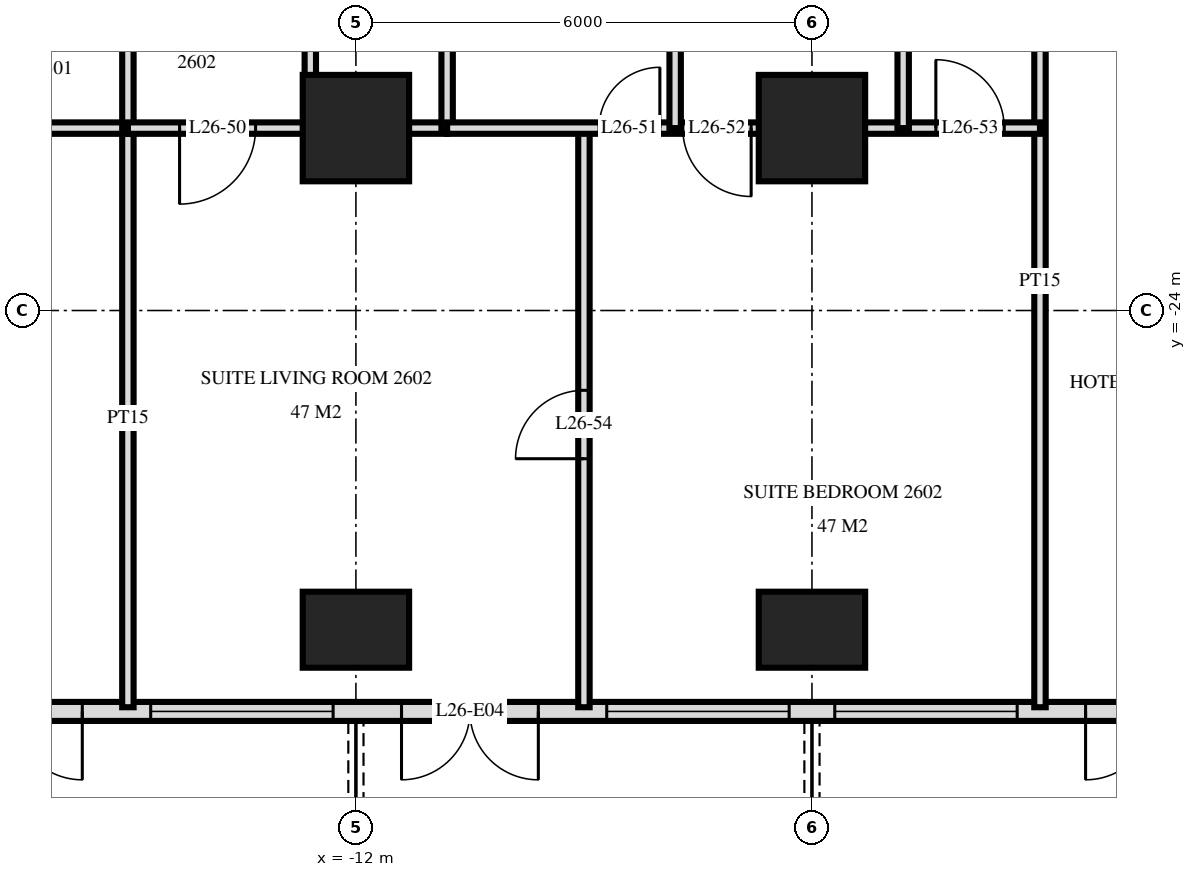
"""IFC4 building model, lengths in metres.
Left out: names, types, materials, properties, quantities, classifications, styles, units other than length and angle.
Written with IfcOpenShell. Run it as: python <this file> out.ifc"""

import sys

from ifc_helpers import new_model, si_unit, direction, frame, frame_2d, origin, origin_2d, place, context, subcontext, project, spatial, rectangle, extrude, element, fill, save


model = new_model("IFC4")
c1 = context("Model", 3, precision=1e-05, world=origin(), true_north=direction((0.0, 1.0)))
c2 = subcontext(c1, "Body", "Model", "MODEL_VIEW")
j1 = project(units=[si_unit("LENGTHUNIT", "METRE"), si_unit("PLANEANGLEUNIT", "RADIAN")], contexts=[c1])
p1 = place(None, origin())
s1 = spatial("IfcSite", under=j1, at=p1, CompositionType="ELEMENT")
p2 = place(p1, origin())
s2 = spatial("IfcBuilding", under=s1, at=p2, CompositionType="ELEMENT")
p3 = place(p2, frame((0.0, 0.0, 103.2)))
s3 = spatial("IfcBuildingStorey", under=s2, at=p3, CompositionType="ELEMENT", Elevation=103.2)
p4 = place(p3, frame((-12.0, -28.2, 0.0), z_axis=(0.0, 0.0, 1.0), x_axis=(1.0, 0.0, 0.0)))
e1 = element("IfcColumn", 1, at=p4, inside=s3, PredefinedType="COLUMN", context=c2, shape_type="SweptSolid", body=[
    extrude(rectangle(XDim=1.4, YDim=1.0, at=origin_2d()), origin(), (0.0, 0.0, 1.0), 3.6),
])
p5 = place(p3, frame((-12.0, -21.6, 0.0), z_axis=(0.0, 0.0, 1.0), x_axis=(1.0, 0.0, 0.0)))
e2 = element("IfcColumn", 2, at=p5, inside=s3, PredefinedType="COLUMN", context=c2, shape_type="SweptSolid", body=[
    extrude(rectangle(XDim=1.4, YDim=1.4, at=origin_2d()), origin(), (0.0, 0.0, 1.0), 3.6),
])
p6 = place(p3, frame((-6.0, -28.2, 0.0), z_axis=(0.0, 0.0, 1.0), x_axis=(1.0, 0.0, 0.0)))
e3 = element("IfcColumn", 3, at=p6, inside=s3, PredefinedType="COLUMN", context=c2, shape_type="SweptSolid", body=[
    extrude(rectangle(XDim=1.4, YDim=1.0, at=origin_2d()), origin(), (0.0, 0.0, 1.0), 3.6),
])
p7 = place(p3, frame((-6.0, -21.6, 0.0), z_axis=(0.0, 0.0, 1.0), x_axis=(1.0, 0.0, 0.0)))
e4 = element("IfcColumn", 4, at=p7, inside=s3, PredefinedType="COLUMN", context=c2, shape_type="SweptSolid", body=[
    extrude(rectangle(XDim=1.4, YDim=1.4, at=origin_2d()), origin(), (0.0, 0.0, 1.0), 3.6),
])
p8 = place(p3, frame((-28.775, -29.275, 0.0), z_axis=(0.0, 0.0, 1.0), x_axis=(1.0, 0.0, 0.0)))
e5 = element("IfcWall", 5, at=p8, inside=s3, PredefinedType="SOLIDWALL", context=c2, shape_type="SweptSolid", body=[
    extrude(rectangle(XDim=57.551, YDim=0.25, at=frame_2d((28.775, 0.0))), origin(), (0.0, 0.0, 1.0), 3.3),
])
p9 = place(p8, frame((0.575, 0.0, 0.0)))
e6 = element("IfcOpeningElement", 6, at=p9, cuts=e5, PredefinedType="OPENING", context=c2, shape_type="SweptSolid", body=[
    extrude(rectangle(XDim=1.8, YDim=2.4, at=frame_2d((0.9, 1.2))), frame((0.0, 0.135, 0.0), z_axis=(0.0, -1.0, 0.0), x_axis=(1.0, 0.0, 0.0)), (0.0, 0.0, 1.0), 0.27),
])
p10 = place(p8, frame((5.375, 0.0, 0.0)))
e7 = element("IfcOpeningElement", 7, at=p10, cuts=e5, PredefinedType="OPENING", context=c2, shape_type="SweptSolid", body=[
    extrude(rectangle(XDim=1.8, YDim=2.4, at=frame_2d((0.9, 1.2))), frame((0.0, 0.135, 0.0), z_axis=(0.0, -1.0, 0.0), x_axis=(1.0, 0.0, 0.0)), (0.0, 0.0, 1.0), 0.27),
])
p11 = place(p8, frame((8.075, 0.0, 0.3)))
e8 = element("IfcOpeningElement", 8, at=p11, cuts=e5, PredefinedType="OPENING", context=c2, shape_type="SweptSolid", body=[
    extrude(rectangle(XDim=2.4, YDim=2.1, at=frame_2d((1.2, 1.05))), frame((0.0, 0.135, 0.0), z_axis=(0.0, -1.0, 0.0), x_axis=(1.0, 0.0, 0.0)), (0.0, 0.0, 1.0), 0.27),
])
p12 = place(p8, frame((11.375, 0.0, 0.0)))
e9 = element("IfcOpeningElement", 9, at=p12, cuts=e5, PredefinedType="OPENING", context=c2, shape_type="SweptSolid", body=[
    extrude(rectangle(XDim=1.8, YDim=2.4, at=frame_2d((0.9, 1.2))), frame((0.0, 0.135, 0.0), z_axis=(0.0, -1.0, 0.0), x_axis=(1.0, 0.0, 0.0)), (0.0, 0.0, 1.0), 0.27),
])
p13 = place(p8, frame((14.075, 0.0, 0.3)))
e10 = element("IfcOpeningElement", 10, at=p13, cuts=e5, PredefinedType="OPENING", context=c2, shape_type="SweptSolid", body=[
    extrude(rectangle(XDim=2.4, YDim=2.1, at=frame_2d((1.2, 1.05))), frame((0.0, 0.135, 0.0), z_axis=(0.0, -1.0, 0.0), x_axis=(1.0, 0.0, 0.0)), (0.0, 0.0, 1.0), 0.27),
])
p14 = place(p8, frame((17.375, 0.0, 0.0)))
e11 = element("IfcOpeningElement", 11, at=p14, cuts=e5, PredefinedType="OPENING", context=c2, shape_type="SweptSolid", body=[
    extrude(rectangle(XDim=1.8, YDim=2.4, at=frame_2d((0.9, 1.2))), frame((0.0, 0.135, 0.0), z_axis=(0.0, -1.0, 0.0), x_axis=(1.0, 0.0, 0.0)), (0.0, 0.0, 1.0), 0.27),
])
p15 = place(p8, frame((20.075, 0.0, 0.3)))
e12 = element("IfcOpeningElement", 12, at=p15, cuts=e5, PredefinedType="OPENING", context=c2, shape_type="SweptSolid", body=[
    extrude(rectangle(XDim=2.4, YDim=2.1, at=frame_2d((1.2, 1.05))), frame((0.0, 0.135, 0.0), z_axis=(0.0, -1.0, 0.0), x_axis=(1.0, 0.0, 0.0)), (0.0, 0.0, 1.0), 0.27),
])
p16 = place(p8, frame((23.075, 0.0, 0.3)))
e13 = element("IfcOpeningElement", 13, at=p16, cuts=e5, PredefinedType="OPENING", context=c2, shape_type="SweptSolid", body=[
    extrude(rectangle(XDim=2.4, YDim=2.1, at=frame_2d((1.2, 1.05))), frame((0.0, 0.135, 0.0), z_axis=(0.0, -1.0, 0.0), x_axis=(1.0, 0.0, 0.0)), (0.0, 0.0, 1.0), 0.27),
])
p17 = place(p8, frame((26.375, 0.0, 0.0)))
e14 = element("IfcOpeningElement", 14, at=p17, cuts=e5, PredefinedType="OPENING", context=c2, shape_type="SweptSolid", body=[
    extrude(rectangle(XDim=1.8, YDim=2.4, at=frame_2d((0.9, 1.2))), frame((0.0, 0.135, 0.0), z_axis=(0.0, -1.0, 0.0), x_axis=(1.0, 0.0, 0.0)), (0.0, 0.0, 1.0), 0.27),
])
p18 = place(p8, frame((29.075, 0.0, 0.3)))
e15 = element("IfcOpeningElement", 15, at=p18, cuts=e5, PredefinedType="OPENING", context=c2, shape_type="SweptSolid", body=[
    extrude(rectangle(XDim=2.4, YDim=2.1, at=frame_2d((1.2, 1.05))), frame((0.0, 0.135, 0.0), z_axis=(0.0, -1.0, 0.0), x_axis=(1.0, 0.0, 0.0)), (0.0, 0.0, 1.0), 0.27),
])
p19 = place(p8, frame((32.375, 0.0, 0.0)))
e16 = element("IfcOpeningElement", 16, at=p19, cuts=e5, PredefinedType="OPENING", context=c2, shape_type="SweptSolid", body=[
    extrude(rectangle(XDim=1.8, YDim=2.4, at=frame_2d((0.9, 1.2))), frame((0.0, 0.135, 0.0), z_axis=(0.0, -1.0, 0.0), x_axis=(1.0, 0.0, 0.0)), (0.0, 0.0, 1.0), 0.27),
])
p20 = place(p8, frame((35.375, 0.0, 0.0)))
e17 = element("IfcOpeningElement", 17, at=p20, cuts=e5, PredefinedType="OPENING", context=c2, shape_type="SweptSolid", body=[
    extrude(rectangle(XDim=1.8, YDim=2.4, at=frame_2d((0.9, 1.2))), frame((0.0, 0.135, 0.0), z_axis=(0.0, -1.0, 0.0), x_axis=(1.0, 0.0, 0.0)), (0.0, 0.0, 1.0), 0.27),
])
p21 = place(p8, frame((38.075, 0.0, 0.3)))
e18 = element("IfcOpeningElement", 18, at=p21, cuts=e5, PredefinedType="OPENING", context=c2, shape_type="SweptSolid", body=[
    extrude(rectangle(XDim=2.4, YDim=2.1, at=frame_2d((1.2, 1.05))), frame((0.0, 0.135, 0.0), z_axis=(0.0, -1.0, 0.0), x_axis=(1.0, 0.0, 0.0)), (0.0, 0.0, 1.0), 0.27),
])
p22 = place(p8, frame((41.375, 0.0, 0.0)))
e19 = element("IfcOpeningElement", 19, at=p22, cuts=e5, PredefinedType="OPENING", context=c2, shape_type="SweptSolid", body=[
    extrude(rectangle(XDim=1.8, YDim=2.4, at=frame_2d((0.9, 1.2))), frame((0.0, 0.135, 0.0), z_axis=(0.0, -1.0, 0.0), x_axis=(1.0, 0.0, 0.0)), (0.0, 0.0, 1.0), 0.27),
])
p23 = place(p8, frame((44.075, 0.0, 0.3)))
e20 = element("IfcOpeningElement", 20, at=p23, cuts=e5, PredefinedType="OPENING", context=c2, shape_type="SweptSolid", body=[
    extrude(rectangle(XDim=2.4, YDim=2.1, at=frame_2d((1.2, 1.05))), frame((0.0, 0.135, 0.0), z_axis=(0.0, -1.0, 0.0), x_axis=(1.0, 0.0, 0.0)), (0.0, 0.0, 1.0), 0.27),
])
p24 = place(p8, frame((47.075, 0.0, 0.3)))
e21 = element("IfcOpeningElement", 21, at=p24, cuts=e5, PredefinedType="OPENING", context=c2, shape_type="SweptSolid", body=[
    extrude(rectangle(XDim=2.4, YDim=2.1, at=frame_2d((1.2, 1.05))), frame((0.0, 0.135, 0.0), z_axis=(0.0, -1.0, 0.0), x_axis=(1.0, 0.0, 0.0)), (0.0, 0.0, 1.0), 0.27),
])
p25 = place(p8, frame((50.375, 0.0, 0.0)))
e22 = element("IfcOpeningElement", 22, at=p25, cuts=e5, PredefinedType="OPENING", context=c2, shape_type="SweptSolid", body=[
    extrude(rectangle(XDim=1.8, YDim=2.4, at=frame_2d((0.9, 1.2))), frame((0.0, 0.135, 0.0), z_axis=(0.0, -1.0, 0.0), x_axis=(1.0, 0.0, 0.0)), (0.0, 0.0, 1.0), 0.27),
])
p26 = place(p8, frame((53.375, 0.0, 0.0)))
e23 = element("IfcOpeningElement", 23, at=p26, cuts=e5, PredefinedType="OPENING", context=c2, shape_type="SweptSolid", body=[
    extrude(rectangle(XDim=1.8, YDim=2.4, at=frame_2d((0.9, 1.2))), frame((0.0, 0.135, 0.0), z_axis=(0.0, -1.0, 0.0), x_axis=(1.0, 0.0, 0.0)), (0.0, 0.0, 1.0), 0.27),
])
p27 = place(p3, frame((-3.0, -29.22, 0.0), z_axis=(0.0, 0.0, 1.0), x_axis=(0.0, 1.0, 0.0)))
e24 = element("IfcWall", 24, at=p27, inside=s3, PredefinedType="PARTITIONING", context=c2, shape_type="SweptSolid", body=[
    extrude(rectangle(XDim=11.22, YDim=0.15, at=frame_2d((5.61, 0.0))), origin(), (0.0, 0.0, 1.0), 3.32),
])
for number, where, z_axis, x_axis in (
    (25, (-4.8, -21.6, 0.0), (0.0, 0.0, 1.0), (0.0, 1.0, 0.0)),
    (26, (-7.8, -21.6, 0.0), (0.0, 0.0, 1.0), (0.0, 1.0, 0.0)),
):
    element("IfcWall", number, at=place(p3, frame(where, z_axis=z_axis, x_axis=x_axis)), inside=s3, PredefinedType="PARTITIONING", context=c2, shape_type="SweptSolid", body=[
        extrude(rectangle(XDim=3.6, YDim=0.15, at=frame_2d((1.8, 0.0))), origin(), (0.0, 0.0, 1.0), 3.32),
    ])
p28 = place(p3, frame((-9.0, -29.22, 0.0), z_axis=(0.0, 0.0, 1.0), x_axis=(0.0, 1.0, 0.0)))
e27 = element("IfcWall", 27, at=p28, inside=s3, PredefinedType="PARTITIONING", context=c2, shape_type="SweptSolid", body=[
    extrude(rectangle(XDim=7.62, YDim=0.15, at=frame_2d((3.81, 0.0))), origin(), (0.0, 0.0, 1.0), 3.32),
])
p29 = place(p28, frame((3.27, 0.0, 0.0)))
e28 = element("IfcOpeningElement", 28, at=p29, cuts=e27, PredefinedType="OPENING", context=c2, shape_type="SweptSolid", body=[
    extrude(rectangle(XDim=0.9, YDim=2.1, at=frame_2d((0.45, 1.05))), frame((0.0, 0.085, 0.0), z_axis=(0.0, -1.0, 0.0), x_axis=(1.0, 0.0, 0.0)), (0.0, 0.0, 1.0), 0.17),
])
p30 = place(p3, frame((-10.8, -21.6, 0.0), z_axis=(0.0, 0.0, 1.0), x_axis=(0.0, 1.0, 0.0)))
e29 = element("IfcWall", 29, at=p30, inside=s3, PredefinedType="PLUMBINGWALL", context=c2, shape_type="SweptSolid", body=[
    extrude(rectangle(XDim=3.6, YDim=0.15, at=frame_2d((1.8, 0.0))), origin(), (0.0, 0.0, 1.0), 3.32),
])
p31 = place(p3, frame((-12.6, -21.6, 0.0), z_axis=(0.0, 0.0, 1.0), x_axis=(0.0, 1.0, 0.0)))
e30 = element("IfcWall", 30, at=p31, inside=s3, PredefinedType="PARTITIONING", context=c2, shape_type="SweptSolid", body=[
    extrude(rectangle(XDim=3.6, YDim=0.15, at=frame_2d((1.8, 0.0))), origin(), (0.0, 0.0, 1.0), 3.32),
])
p32 = place(p31, frame((1.32, 0.0, 0.0)))
e31 = element("IfcOpeningElement", 31, at=p32, cuts=e30, PredefinedType="OPENING", context=c2, shape_type="SweptSolid", body=[
    extrude(rectangle(XDim=1.0, YDim=2.1, at=frame_2d((0.5, 1.05))), frame((0.0, 0.085, 0.0), z_axis=(0.0, -1.0, 0.0), x_axis=(1.0, 0.0, 0.0)), (0.0, 0.0, 1.0), 0.17),
])
p33 = place(p3, frame((-15.0, -21.6, 0.0), z_axis=(0.0, 0.0, 1.0), x_axis=(0.0, 1.0, 0.0)))
e32 = element("IfcWall", 32, at=p33, inside=s3, PredefinedType="PARTITIONING", context=c2, shape_type="SweptSolid", body=[
    extrude(rectangle(XDim=3.6, YDim=0.15, at=frame_2d((1.8, 0.0))), origin(), (0.0, 0.0, 1.0), 3.32),
])
p34 = place(p3, frame((-15.0, -29.22, 0.0), z_axis=(0.0, 0.0, 1.0), x_axis=(0.0, 1.0, 0.0)))
e33 = element("IfcWall", 33, at=p34, inside=s3, PredefinedType="PARTITIONING", context=c2, shape_type="SweptSolid", body=[
    extrude(rectangle(XDim=7.62, YDim=0.15, at=frame_2d((3.81, 0.0))), origin(), (0.0, 0.0, 1.0), 3.32),
])
p35 = place(p3, frame((-15.0, -21.6, 0.0), z_axis=(0.0, 0.0, 1.0), x_axis=(1.0, 0.0, 0.0)))
e34 = element("IfcWall", 34, at=p35, inside=s3, PredefinedType="PARTITIONING", context=c2, shape_type="SweptSolid", body=[
    extrude(rectangle(XDim=2.4, YDim=0.15, at=frame_2d((1.2, 0.0))), origin(), (0.0, 0.0, 1.0), 3.32),
])
p36 = place(p35, frame((0.68, 0.0, 0.0)))
e35 = element("IfcOpeningElement", 35, at=p36, cuts=e34, PredefinedType="OPENING", context=c2, shape_type="SweptSolid", body=[
    extrude(rectangle(XDim=1.0, YDim=2.1, at=frame_2d((0.5, 1.05))), frame((0.0, 0.085, 0.0), z_axis=(0.0, -1.0, 0.0), x_axis=(1.0, 0.0, 0.0)), (0.0, 0.0, 1.0), 0.17),
])
p37 = place(p3, frame((-17.7, -21.6, 0.0), z_axis=(0.0, 0.0, 1.0), x_axis=(1.0, 0.0, 0.0)))
e36 = element("IfcWall", 36, at=p37, inside=s3, PredefinedType="PARTITIONING", context=c2, shape_type="SweptSolid", body=[
    extrude(rectangle(XDim=2.7, YDim=0.15, at=frame_2d((1.35, 0.0))), origin(), (0.0, 0.0, 1.0), 3.32),
])
p38 = place(p3, frame((-10.8, -21.6, 0.0), z_axis=(0.0, 0.0, 1.0), x_axis=(1.0, 0.0, 0.0)))
e37 = element("IfcWall", 37, at=p38, inside=s3, PredefinedType="PARTITIONING", context=c2, shape_type="SweptSolid", body=[
    extrude(rectangle(XDim=7.8, YDim=0.15, at=frame_2d((3.9, 0.0))), origin(), (0.0, 0.0, 1.0), 3.32),
])
p39 = place(p38, frame((1.999, 0.0, 0.0)))
e38 = element("IfcOpeningElement", 38, at=p39, cuts=e37, PredefinedType="OPENING", context=c2, shape_type="SweptSolid", body=[
    extrude(rectangle(XDim=0.8, YDim=2.1, at=frame_2d((0.4, 1.05))), frame((0.0, 0.085, 0.0), z_axis=(0.0, -1.0, 0.0), x_axis=(1.0, 0.0, 0.0)), (0.0, 0.0, 1.0), 0.17),
])
p40 = place(p38, frame((3.1, 0.0, 0.0)))
e39 = element("IfcOpeningElement", 39, at=p40, cuts=e37, PredefinedType="OPENING", context=c2, shape_type="SweptSolid", body=[
    extrude(rectangle(XDim=0.9, YDim=2.1, at=frame_2d((0.45, 1.05))), frame((0.0, 0.085, 0.0), z_axis=(0.0, -1.0, 0.0), x_axis=(1.0, 0.0, 0.0)), (0.0, 0.0, 1.0), 0.17),
])
p41 = place(p38, frame((6.43, 0.0, 0.0)))
e40 = element("IfcOpeningElement", 40, at=p41, cuts=e37, PredefinedType="OPENING", context=c2, shape_type="SweptSolid", body=[
    extrude(rectangle(XDim=0.9, YDim=2.1, at=frame_2d((0.45, 1.05))), frame((0.0, 0.085, 0.0), z_axis=(0.0, -1.0, 0.0), x_axis=(1.0, 0.0, 0.0)), (0.0, 0.0, 1.0), 0.17),
])
p42 = place(p3, frame((-12.6, -21.6, 0.0), z_axis=(0.0, 0.0, 1.0), x_axis=(1.0, 0.0, 0.0)))
e41 = element("IfcWall", 41, at=p42, inside=s3, PredefinedType="PLUMBINGWALL", context=c2, shape_type="SweptSolid", body=[
    extrude(rectangle(XDim=1.8, YDim=0.15, at=frame_2d((0.9, 0.0))), origin(), (0.0, 0.0, 1.0), 3.32),
])
p43 = place(p12, frame((0.9, 0.0, 0.0), z_axis=(0.0, 0.0, 1.0), x_axis=(-1.0, 0.0, 0.0)))
e42 = element("IfcDoor", 42, at=p43, inside=s3, OperationType="DOUBLE_DOOR_SINGLE_SWING", PredefinedType="DOOR", context=c2, shape_type="SweptSolid", body=[
    extrude(rectangle(XDim=1.8, YDim=2.4, at=frame_2d((0.0, 1.2))), frame((0.0, -0.025, 0.0), z_axis=(0.0, 1.0, 0.0), x_axis=(-1.0, 0.0, 0.0)), (0.0, 0.0, 1.0), 0.05),
])
fill(e9, e42)
p44 = place(p13, origin())
e43 = element("IfcWindow", 43, at=p44, inside=s3, PartitioningType="SINGLE_PANEL", PredefinedType="WINDOW", context=c2, shape_type="SweptSolid", body=[
    extrude(rectangle(XDim=2.4, YDim=2.1, at=frame_2d((1.2, 1.05))), frame((0.0, 0.03, 0.0), z_axis=(0.0, -1.0, 0.0), x_axis=(1.0, 0.0, 0.0)), (0.0, 0.0, 1.0), 0.06),
])
fill(e10, e43)
p45 = place(p14, frame((0.9, 0.0, 0.0), z_axis=(0.0, 0.0, 1.0), x_axis=(-1.0, 0.0, 0.0)))
e44 = element("IfcDoor", 44, at=p45, inside=s3, OperationType="DOUBLE_DOOR_SINGLE_SWING", PredefinedType="DOOR", context=c2, shape_type="SweptSolid", body=[
    extrude(rectangle(XDim=1.8, YDim=2.4, at=frame_2d((0.0, 1.2))), frame((0.0, -0.025, 0.0), z_axis=(0.0, 1.0, 0.0), x_axis=(-1.0, 0.0, 0.0)), (0.0, 0.0, 1.0), 0.05),
])
fill(e11, e44)
p46 = place(p15, origin())
e45 = element("IfcWindow", 45, at=p46, inside=s3, PartitioningType="SINGLE_PANEL", PredefinedType="WINDOW", context=c2, shape_type="SweptSolid", body=[
    extrude(rectangle(XDim=2.4, YDim=2.1, at=frame_2d((1.2, 1.05))), frame((0.0, 0.03, 0.0), z_axis=(0.0, -1.0, 0.0), x_axis=(1.0, 0.0, 0.0)), (0.0, 0.0, 1.0), 0.06),
])
fill(e12, e45)
p47 = place(p16, origin())
e46 = element("IfcWindow", 46, at=p47, inside=s3, PartitioningType="SINGLE_PANEL", PredefinedType="WINDOW", context=c2, shape_type="SweptSolid", body=[
    extrude(rectangle(XDim=2.4, YDim=2.1, at=frame_2d((1.2, 1.05))), frame((0.0, 0.03, 0.0), z_axis=(0.0, -1.0, 0.0), x_axis=(1.0, 0.0, 0.0)), (0.0, 0.0, 1.0), 0.06),
])
fill(e13, e46)
p48 = place(p17, frame((0.9, 0.0, 0.0), z_axis=(0.0, 0.0, 1.0), x_axis=(-1.0, 0.0, 0.0)))
e47 = element("IfcDoor", 47, at=p48, inside=s3, OperationType="DOUBLE_DOOR_SINGLE_SWING", PredefinedType="DOOR", context=c2, shape_type="SweptSolid", body=[
    extrude(rectangle(XDim=1.8, YDim=2.4, at=frame_2d((0.0, 1.2))), frame((0.0, -0.025, 0.0), z_axis=(0.0, 1.0, 0.0), x_axis=(-1.0, 0.0, 0.0)), (0.0, 0.0, 1.0), 0.05),
])
fill(e14, e47)
p49 = place(p36, frame((0.5, 0.0, 0.0), z_axis=(0.0, 0.0, 1.0), x_axis=(-1.0, 0.0, 0.0)))
e48 = element("IfcDoor", 48, at=p49, inside=s3, OperationType="SINGLE_SWING_LEFT", PredefinedType="DOOR", context=c2, shape_type="SweptSolid", body=[
    extrude(rectangle(XDim=1.0, YDim=2.1, at=frame_2d((0.0, 1.05))), frame((0.0, -0.025, 0.0), z_axis=(0.0, 1.0, 0.0), x_axis=(-1.0, 0.0, 0.0)), (0.0, 0.0, 1.0), 0.05),
])
fill(e35, e48)
p50 = place(p39, origin())
e49 = element("IfcDoor", 49, at=p50, inside=s3, OperationType="SINGLE_SWING_LEFT", PredefinedType="DOOR", context=c2, shape_type="SweptSolid", body=[
    extrude(rectangle(XDim=0.8, YDim=2.1, at=frame_2d((0.4, 1.05))), frame((0.0, 0.025, 0.0), z_axis=(0.0, -1.0, 0.0), x_axis=(1.0, 0.0, 0.0)), (0.0, 0.0, 1.0), 0.05),
])
fill(e38, e49)
p51 = place(p40, frame((0.45, 0.0, 0.0), z_axis=(0.0, 0.0, 1.0), x_axis=(-1.0, 0.0, 0.0)))
e50 = element("IfcDoor", 50, at=p51, inside=s3, OperationType="SINGLE_SWING_RIGHT", PredefinedType="DOOR", context=c2, shape_type="SweptSolid", body=[
    extrude(rectangle(XDim=0.9, YDim=2.1, at=frame_2d((0.0, 1.05))), frame((0.0, -0.025, 0.0), z_axis=(0.0, 1.0, 0.0), x_axis=(-1.0, 0.0, 0.0)), (0.0, 0.0, 1.0), 0.05),
])
fill(e39, e50)
p52 = place(p41, origin())
e51 = element("IfcDoor", 51, at=p52, inside=s3, OperationType="SINGLE_SWING_RIGHT", PredefinedType="DOOR", context=c2, shape_type="SweptSolid", body=[
    extrude(rectangle(XDim=0.9, YDim=2.1, at=frame_2d((0.45, 1.05))), frame((0.0, 0.025, 0.0), z_axis=(0.0, -1.0, 0.0), x_axis=(1.0, 0.0, 0.0)), (0.0, 0.0, 1.0), 0.05),
])
fill(e40, e51)
p53 = place(p29, origin())
e52 = element("IfcDoor", 52, at=p53, inside=s3, OperationType="SINGLE_SWING_RIGHT", PredefinedType="DOOR", context=c2, shape_type="SweptSolid", body=[
    extrude(rectangle(XDim=0.9, YDim=2.1, at=frame_2d((0.45, 1.05))), frame((0.0, 0.025, 0.0), z_axis=(0.0, -1.0, 0.0), x_axis=(1.0, 0.0, 0.0)), (0.0, 0.0, 1.0), 0.05),
])
fill(e28, e52)
save(model, sys.argv[1])
